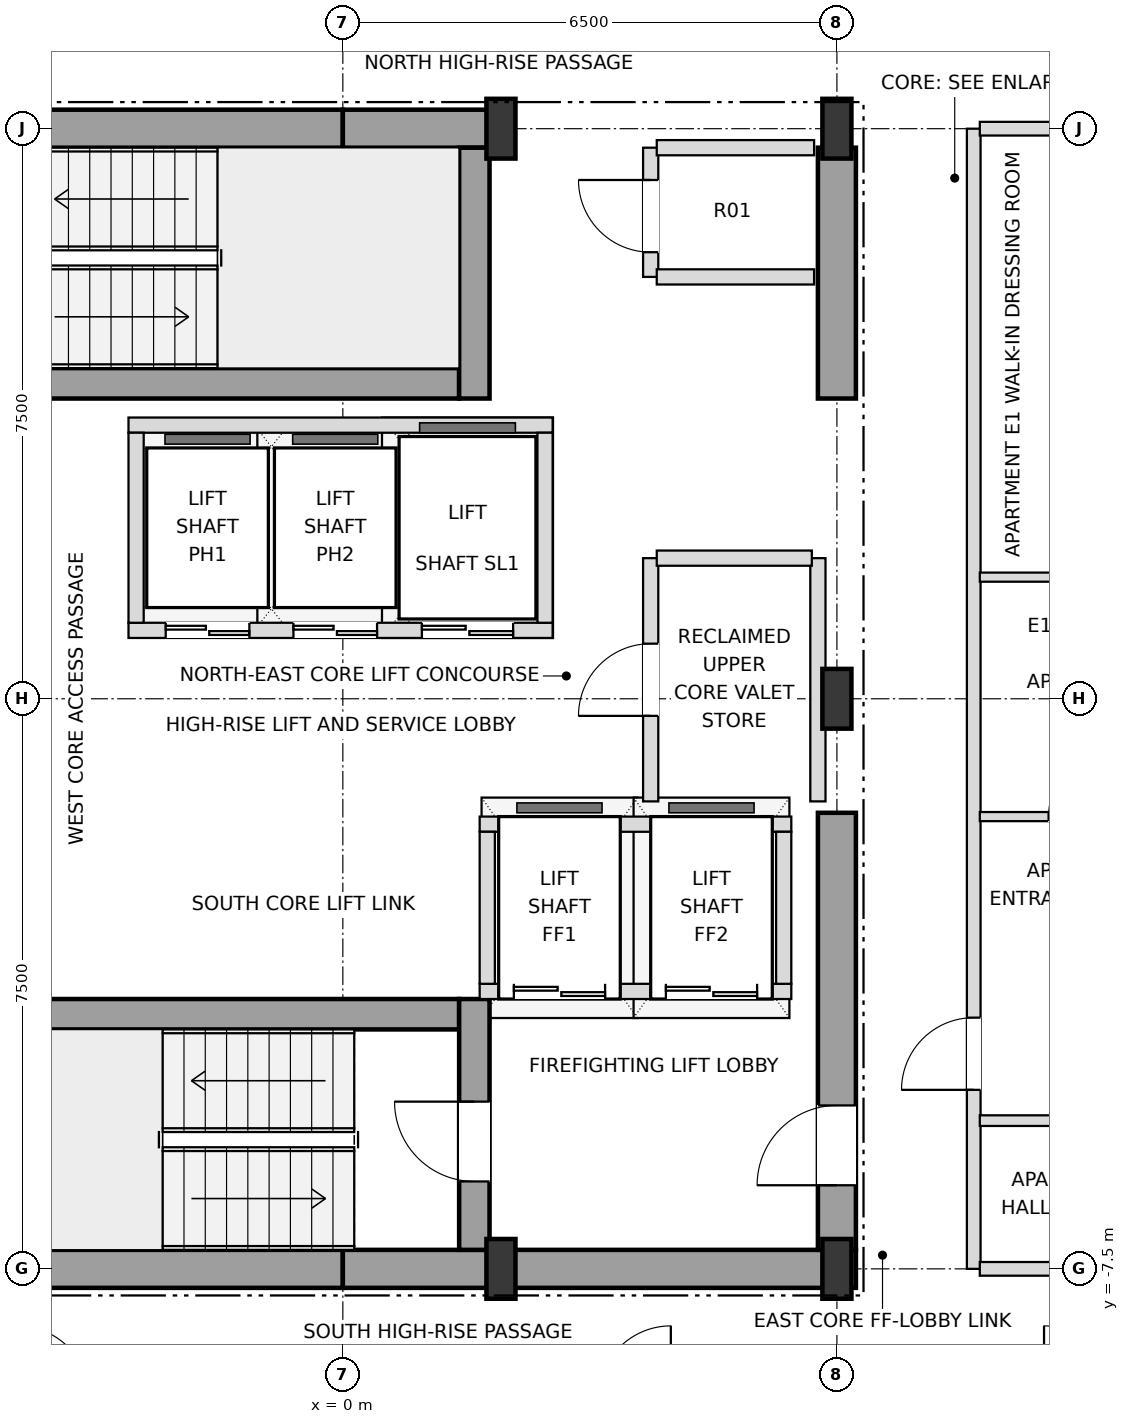
"""IFC4 building model, lengths in metres.
Left out: names, types, materials, properties, quantities, classifications, styles, units other than length and angle.
Written with IfcOpenShell. Run it as: python <this file> out.ifc"""

import sys

from ifc_helpers import new_model, si_unit, direction, frame, frame_2d, origin, origin_2d, place, context, subcontext, project, spatial, rectangle, i_section, extrude, element, fill, save


model = new_model("IFC4")
c1 = context("Model", 3, precision=1e-05, world=origin(), true_north=direction((0.0, 1.0)))
c2 = subcontext(c1, "Body", "Model", "MODEL_VIEW")
j1 = project(units=[si_unit("LENGTHUNIT", "METRE"), si_unit("PLANEANGLEUNIT", "RADIAN")], contexts=[c1])
p1 = place(None, origin())
s1 = spatial("IfcSite", under=j1, at=p1, CompositionType="ELEMENT")
p2 = place(p1, origin())
s2 = spatial("IfcBuilding", under=s1, at=p2, CompositionType="ELEMENT")
p3 = place(p2, frame((0.0, 0.0, 251.1)))
s3 = spatial("IfcBuildingStorey", under=s2, at=p3, CompositionType="ELEMENT", Elevation=251.1)
for number, where, z_axis, x_axis in (
    (1, (2.08, -7.5, 0.0), (0.0, 0.0, 1.0), (1.0, 0.0, 0.0)),
    (2, (6.5, -7.5, 0.0), (0.0, 0.0, 1.0), (1.0, 0.0, 0.0)),
    (3, (6.5, 0.0, 0.0), (0.0, 0.0, 1.0), (1.0, 0.0, 0.0)),
    (4, (2.08, 7.5, 0.0), (0.0, 0.0, 1.0), (1.0, 0.0, 0.0)),
    (5, (6.5, 7.5, 0.0), (0.0, 0.0, 1.0), (1.0, 0.0, 0.0)),
):
    element("IfcColumn", number, at=place(p3, frame(where, z_axis=z_axis, x_axis=x_axis)), inside=s3, PredefinedType="COLUMN", context=c2, shape_type="SweptSolid", body=[
        extrude(i_section(OverallWidth=0.382, OverallDepth=0.786, WebThickness=0.02, FlangeThickness=0.033, at=origin_2d()), origin(), (0.0, 0.0, 1.0), 3.6),
    ])
for number, where, z_axis, x_axis in (
    (6, (-6.75, -7.5, 0.0), (0.0, 0.0, 1.0), (1.0, 0.0, 0.0)),
    (7, (0.0, -7.5, 0.0), (0.0, 0.0, 1.0), (1.0, 0.0, 0.0)),
):
    element("IfcWall", number, at=place(p3, frame(where, z_axis=z_axis, x_axis=x_axis)), inside=s3, PredefinedType="SHEAR", context=c2, shape_type="SweptSolid", body=[
        extrude(rectangle(XDim=6.75, YDim=0.5, at=frame_2d((3.375, 0.0))), origin(), (0.0, 0.0, 1.0), 3.38),
    ])
p4 = place(p3, frame((-6.75, 7.5, 0.0), z_axis=(0.0, 0.0, 1.0), x_axis=(1.0, 0.0, 0.0)))
e8 = element("IfcWall", 8, at=p4, inside=s3, PredefinedType="SHEAR", context=c2, shape_type="SweptSolid", body=[
    extrude(rectangle(XDim=6.75, YDim=0.5, at=frame_2d((3.375, 0.0))), origin(), (0.0, 0.0, 1.0), 3.38),
])
p5 = place(p4, frame((1.65, 0.0, 0.0)))
e9 = element("IfcOpeningElement", 9, at=p5, cuts=e8, PredefinedType="OPENING", context=c2, shape_type="SweptSolid", body=[
    extrude(rectangle(XDim=1.05, YDim=2.15, at=frame_2d((0.525, 1.075))), frame((0.0, 0.26, 0.0), z_axis=(0.0, -1.0, 0.0), x_axis=(1.0, 0.0, 0.0)), (0.0, 0.0, 1.0), 0.52),
])
p6 = place(p3, frame((0.0, 7.5, 0.0), z_axis=(0.0, 0.0, 1.0), x_axis=(1.0, 0.0, 0.0)))
e10 = element("IfcWall", 10, at=p6, inside=s3, PredefinedType="SHEAR", context=c2, shape_type="SweptSolid", body=[
    extrude(rectangle(XDim=2.08, YDim=0.5, at=frame_2d((1.04, 0.0))), origin(), (0.0, 0.0, 1.0), 3.38),
])
p7 = place(p3, frame((6.5, -7.25, 0.0), z_axis=(0.0, 0.0, 1.0), x_axis=(0.0, 1.0, 0.0)))
e11 = element("IfcWall", 11, at=p7, inside=s3, PredefinedType="SHEAR", context=c2, shape_type="SweptSolid", body=[
    extrude(rectangle(XDim=5.75, YDim=0.5, at=frame_2d((2.875, 0.0))), origin(), (0.0, 0.0, 1.0), 3.38),
])
p8 = place(p7, frame((0.85, 0.0, 0.0)))
e12 = element("IfcOpeningElement", 12, at=p8, cuts=e11, PredefinedType="OPENING", context=c2, shape_type="SweptSolid", body=[
    extrude(rectangle(XDim=1.05, YDim=2.15, at=frame_2d((0.525, 1.075))), frame((0.0, 0.26, 0.0), z_axis=(0.0, -1.0, 0.0), x_axis=(1.0, 0.0, 0.0)), (0.0, 0.0, 1.0), 0.52),
])
p9 = place(p3, frame((6.5, 3.95, 0.0), z_axis=(0.0, 0.0, 1.0), x_axis=(0.0, 1.0, 0.0)))
e13 = element("IfcWall", 13, at=p9, inside=s3, PredefinedType="SHEAR", context=c2, shape_type="SweptSolid", body=[
    extrude(rectangle(XDim=3.3, YDim=0.5, at=frame_2d((1.65, 0.0))), origin(), (0.0, 0.0, 1.0), 3.38),
])
p10 = place(p3, frame((-6.25, -4.15, 0.0), z_axis=(0.0, 0.0, 1.0), x_axis=(1.0, 0.0, 0.0)))
e14 = element("IfcWall", 14, at=p10, inside=s3, PredefinedType="SHEAR", context=c2, shape_type="SweptSolid", body=[
    extrude(rectangle(XDim=7.78, YDim=0.4, at=frame_2d((3.89, 0.0))), origin(), (0.0, 0.0, 1.0), 3.38),
])
p11 = place(p3, frame((1.73, -7.25, 0.0), z_axis=(0.0, 0.0, 1.0), x_axis=(0.0, 1.0, 0.0)))
e15 = element("IfcWall", 15, at=p11, inside=s3, PredefinedType="SHEAR", context=c2, shape_type="SweptSolid", body=[
    extrude(rectangle(XDim=3.3, YDim=0.4, at=frame_2d((1.65, 0.0))), origin(), (0.0, 0.0, 1.0), 3.38),
])
p12 = place(p11, frame((0.9, 0.0, 0.0)))
e16 = element("IfcOpeningElement", 16, at=p12, cuts=e15, PredefinedType="OPENING", context=c2, shape_type="SweptSolid", body=[
    extrude(rectangle(XDim=1.05, YDim=2.15, at=frame_2d((0.525, 1.075))), frame((0.0, 0.21, 0.0), z_axis=(0.0, -1.0, 0.0), x_axis=(1.0, 0.0, 0.0)), (0.0, 0.0, 1.0), 0.42),
])
p13 = place(p3, frame((-5.55, 4.15, 0.0), z_axis=(0.0, 0.0, 1.0), x_axis=(1.0, 0.0, 0.0)))
e17 = element("IfcWall", 17, at=p13, inside=s3, PredefinedType="SHEAR", context=c2, shape_type="SweptSolid", body=[
    extrude(rectangle(XDim=7.08, YDim=0.4, at=frame_2d((3.54, 0.0))), origin(), (0.0, 0.0, 1.0), 3.38),
])
p14 = place(p3, frame((1.73, 3.95, 0.0), z_axis=(0.0, 0.0, 1.0), x_axis=(0.0, 1.0, 0.0)))
e18 = element("IfcWall", 18, at=p14, inside=s3, PredefinedType="SHEAR", context=c2, shape_type="SweptSolid", body=[
    extrude(rectangle(XDim=3.3, YDim=0.4, at=frame_2d((1.65, 0.0))), origin(), (0.0, 0.0, 1.0), 3.38),
])
p15 = place(p3, frame((-2.82, 0.9, 0.0), z_axis=(0.0, 0.0, 1.0), x_axis=(1.0, 0.0, 0.0)))
e19 = element("IfcWall", 19, at=p15, inside=s3, PredefinedType="SOLIDWALL", context=c2, shape_type="SweptSolid", body=[
    extrude(rectangle(XDim=5.58, YDim=0.2, at=frame_2d((2.79, 0.0))), origin(), (0.0, 0.0, 1.0), 3.38),
])
p16 = place(p15, frame((0.49, 0.0, 0.0)))
e20 = element("IfcOpeningElement", 20, at=p16, cuts=e19, PredefinedType="OPENING", context=c2, shape_type="SweptSolid", body=[
    extrude(rectangle(XDim=1.1, YDim=2.15, at=frame_2d((0.55, 1.075))), frame((0.0, 0.11, 0.0), z_axis=(0.0, -1.0, 0.0), x_axis=(1.0, 0.0, 0.0)), (0.0, 0.0, 1.0), 0.22),
])
p17 = place(p15, frame((2.17, 0.0, 0.0)))
e21 = element("IfcOpeningElement", 21, at=p17, cuts=e19, PredefinedType="OPENING", context=c2, shape_type="SweptSolid", body=[
    extrude(rectangle(XDim=1.1, YDim=2.15, at=frame_2d((0.55, 1.075))), frame((0.0, 0.11, 0.0), z_axis=(0.0, -1.0, 0.0), x_axis=(1.0, 0.0, 0.0)), (0.0, 0.0, 1.0), 0.22),
])
p18 = place(p15, frame((3.86, 0.0, 0.0)))
e22 = element("IfcOpeningElement", 22, at=p18, cuts=e19, PredefinedType="OPENING", context=c2, shape_type="SweptSolid", body=[
    extrude(rectangle(XDim=1.2, YDim=2.2, at=frame_2d((0.6, 1.1))), frame((0.0, 0.11, 0.0), z_axis=(0.0, -1.0, 0.0), x_axis=(1.0, 0.0, 0.0)), (0.0, 0.0, 1.0), 0.22),
])
p19 = place(p3, frame((-2.82, 3.6, 0.0), z_axis=(0.0, 0.0, 1.0), x_axis=(1.0, 0.0, 0.0)))
e23 = element("IfcWall", 23, at=p19, inside=s3, PredefinedType="SOLIDWALL", context=c2, shape_type="SweptSolid", body=[
    extrude(rectangle(XDim=5.58, YDim=0.2, at=frame_2d((2.79, 0.0))), origin(), (0.0, 0.0, 1.0), 3.38),
])
for number, where, z_axis, x_axis in (
    (24, (-2.72, 1.0, 0.0), (0.0, 0.0, 1.0), (0.0, 1.0, 0.0)),
    (25, (2.66, 1.0, 0.0), (0.0, 0.0, 1.0), (0.0, 1.0, 0.0)),
):
    element("IfcWall", number, at=place(p3, frame(where, z_axis=z_axis, x_axis=x_axis)), inside=s3, PredefinedType="SOLIDWALL", context=c2, shape_type="SweptSolid", body=[
        extrude(rectangle(XDim=2.5, YDim=0.2, at=frame_2d((1.25, 0.0))), origin(), (0.0, 0.0, 1.0), 3.38),
    ])
p20 = place(p3, frame((1.8, -3.85, 0.0), z_axis=(0.0, 0.0, 1.0), x_axis=(1.0, 0.0, 0.0)))
e26 = element("IfcWall", 26, at=p20, inside=s3, PredefinedType="SOLIDWALL", context=c2, shape_type="SweptSolid", body=[
    extrude(rectangle(XDim=4.1, YDim=0.2, at=frame_2d((2.05, 0.0))), origin(), (0.0, 0.0, 1.0), 3.38),
])
p21 = place(p20, frame((0.45, 0.0, 0.0)))
e27 = element("IfcOpeningElement", 27, at=p21, cuts=e26, PredefinedType="OPENING", context=c2, shape_type="SweptSolid", body=[
    extrude(rectangle(XDim=1.2, YDim=2.2, at=frame_2d((0.6, 1.1))), frame((0.0, 0.11, 0.0), z_axis=(0.0, -1.0, 0.0), x_axis=(1.0, 0.0, 0.0)), (0.0, 0.0, 1.0), 0.22),
])
p22 = place(p20, frame((2.45, 0.0, 0.0)))
e28 = element("IfcOpeningElement", 28, at=p22, cuts=e26, PredefinedType="OPENING", context=c2, shape_type="SweptSolid", body=[
    extrude(rectangle(XDim=1.2, YDim=2.2, at=frame_2d((0.6, 1.1))), frame((0.0, 0.11, 0.0), z_axis=(0.0, -1.0, 0.0), x_axis=(1.0, 0.0, 0.0)), (0.0, 0.0, 1.0), 0.22),
])
p23 = place(p3, frame((1.8, -1.65, 0.0), z_axis=(0.0, 0.0, 1.0), x_axis=(1.0, 0.0, 0.0)))
e29 = element("IfcWall", 29, at=p23, inside=s3, PredefinedType="SOLIDWALL", context=c2, shape_type="SweptSolid", body=[
    extrude(rectangle(XDim=4.1, YDim=0.2, at=frame_2d((2.05, 0.0))), origin(), (0.0, 0.0, 1.0), 3.38),
])
for number, where, z_axis, x_axis in (
    (30, (1.9, -3.75, 0.0), (0.0, 0.0, 1.0), (0.0, 1.0, 0.0)),
    (31, (5.8, -3.75, 0.0), (0.0, 0.0, 1.0), (0.0, 1.0, 0.0)),
):
    element("IfcWall", number, at=place(p3, frame(where, z_axis=z_axis, x_axis=x_axis)), inside=s3, PredefinedType="SOLIDWALL", context=c2, shape_type="SweptSolid", body=[
        extrude(rectangle(XDim=2.0, YDim=0.2, at=frame_2d((1.0, 0.0))), origin(), (0.0, 0.0, 1.0), 3.38),
    ])
p24 = place(p3, frame((4.05, -1.35, 0.0), z_axis=(0.0, 0.0, 1.0), x_axis=(0.0, 1.0, 0.0)))
e32 = element("IfcWall", 32, at=p24, inside=s3, PredefinedType="SOLIDWALL", context=c2, shape_type="SweptSolid", body=[
    extrude(rectangle(XDim=3.2, YDim=0.2, at=frame_2d((1.6, 0.0))), origin(), (0.0, 0.0, 1.0), 3.38),
])
p25 = place(p24, frame((1.125, 0.0, 0.0)))
e33 = element("IfcOpeningElement", 33, at=p25, cuts=e32, PredefinedType="OPENING", context=c2, shape_type="SweptSolid", body=[
    extrude(rectangle(XDim=0.95, YDim=2.15, at=frame_2d((0.475, 1.075))), frame((0.0, 0.11, 0.0), z_axis=(0.0, -1.0, 0.0), x_axis=(1.0, 0.0, 0.0)), (0.0, 0.0, 1.0), 0.22),
])
p26 = place(p3, frame((4.05, 5.55, 0.0), z_axis=(0.0, 0.0, 1.0), x_axis=(0.0, 1.0, 0.0)))
e34 = element("IfcWall", 34, at=p26, inside=s3, PredefinedType="SOLIDWALL", context=c2, shape_type="SweptSolid", body=[
    extrude(rectangle(XDim=1.7, YDim=0.2, at=frame_2d((0.85, 0.0))), origin(), (0.0, 0.0, 1.0), 3.38),
])
p27 = place(p26, frame((0.325, 0.0, 0.0)))
e35 = element("IfcOpeningElement", 35, at=p27, cuts=e34, PredefinedType="OPENING", context=c2, shape_type="SweptSolid", body=[
    extrude(rectangle(XDim=0.95, YDim=2.15, at=frame_2d((0.475, 1.075))), frame((0.0, 0.11, 0.0), z_axis=(0.0, -1.0, 0.0), x_axis=(1.0, 0.0, 0.0)), (0.0, 0.0, 1.0), 0.22),
])
p28 = place(p3, frame((6.25, -1.35, 0.0), z_axis=(0.0, 0.0, 1.0), x_axis=(0.0, 1.0, 0.0)))
e36 = element("IfcWall", 36, at=p28, inside=s3, PredefinedType="SOLIDWALL", context=c2, shape_type="SweptSolid", body=[
    extrude(rectangle(XDim=3.2, YDim=0.2, at=frame_2d((1.6, 0.0))), origin(), (0.0, 0.0, 1.0), 3.38),
])
p29 = place(p3, frame((8.3, -7.5, 0.0), z_axis=(0.0, 0.0, 1.0), x_axis=(0.0, 1.0, 0.0)))
e37 = element("IfcWall", 37, at=p29, inside=s3, PredefinedType="PARTITIONING", context=c2, shape_type="SweptSolid", body=[
    extrude(rectangle(XDim=15.0, YDim=0.18, at=frame_2d((7.5, 0.0))), origin(), (0.0, 0.0, 1.0), 3.38),
])
p30 = place(p29, frame((2.355, 0.0, 0.0)))
e38 = element("IfcOpeningElement", 38, at=p30, cuts=e37, PredefinedType="OPENING", context=c2, shape_type="SweptSolid", body=[
    extrude(rectangle(XDim=0.95, YDim=2.15, at=frame_2d((0.475, 1.075))), frame((0.0, 0.1, 0.0), z_axis=(0.0, -1.0, 0.0), x_axis=(1.0, 0.0, 0.0)), (0.0, 0.0, 1.0), 0.2),
])
p31 = place(p3, frame((8.38, -7.5, 0.0), z_axis=(0.0, 0.0, 1.0), x_axis=(1.0, 0.0, 0.0)))
e39 = element("IfcWall", 39, at=p31, inside=s3, PredefinedType="PARTITIONING", context=c2, shape_type="SweptSolid", body=[
    extrude(rectangle(XDim=2.74, YDim=0.18, at=frame_2d((1.37, 0.0))), origin(), (0.0, 0.0, 1.0), 2.826),
])
p32 = place(p3, frame((8.38, -5.55, 0.0), z_axis=(0.0, 0.0, 1.0), x_axis=(1.0, 0.0, 0.0)))
e40 = element("IfcWall", 40, at=p32, inside=s3, PredefinedType="PARTITIONING", context=c2, shape_type="SweptSolid", body=[
    extrude(rectangle(XDim=2.74, YDim=0.14, at=frame_2d((1.37, 0.0))), origin(), (0.0, 0.0, 1.0), 3.38),
])
p33 = place(p32, frame((0.93, 0.0, 0.0)))
e41 = element("IfcOpeningElement", 41, at=p33, cuts=e40, PredefinedType="OPENING", context=c2, shape_type="SweptSolid", body=[
    extrude(rectangle(XDim=0.9, YDim=2.1, at=frame_2d((0.45, 1.05))), frame((0.0, 0.08, 0.0), z_axis=(0.0, -1.0, 0.0), x_axis=(1.0, 0.0, 0.0)), (0.0, 0.0, 1.0), 0.16),
])
p34 = place(p3, frame((8.38, -1.55, 0.0), z_axis=(0.0, 0.0, 1.0), x_axis=(1.0, 0.0, 0.0)))
e42 = element("IfcWall", 42, at=p34, inside=s3, PredefinedType="PARTITIONING", context=c2, shape_type="SweptSolid", body=[
    extrude(rectangle(XDim=2.74, YDim=0.12, at=frame_2d((1.37, 0.0))), origin(), (0.0, 0.0, 1.0), 3.38),
])
p35 = place(p34, frame((0.905, 0.0, 0.0)))
e43 = element("IfcOpeningElement", 43, at=p35, cuts=e42, PredefinedType="OPENING", context=c2, shape_type="SweptSolid", body=[
    extrude(rectangle(XDim=0.95, YDim=2.1, at=frame_2d((0.475, 1.05))), frame((0.0, 0.07, 0.0), z_axis=(0.0, -1.0, 0.0), x_axis=(1.0, 0.0, 0.0)), (0.0, 0.0, 1.0), 0.14),
])
p36 = place(p3, frame((8.38, 1.6, 0.0), z_axis=(0.0, 0.0, 1.0), x_axis=(1.0, 0.0, 0.0)))
e44 = element("IfcWall", 44, at=p36, inside=s3, PredefinedType="PARTITIONING", context=c2, shape_type="SweptSolid", body=[
    extrude(rectangle(XDim=2.74, YDim=0.12, at=frame_2d((1.37, 0.0))), origin(), (0.0, 0.0, 1.0), 3.38),
])
p37 = place(p36, frame((0.93, 0.0, 0.0)))
e45 = element("IfcOpeningElement", 45, at=p37, cuts=e44, PredefinedType="OPENING", context=c2, shape_type="SweptSolid", body=[
    extrude(rectangle(XDim=0.9, YDim=2.1, at=frame_2d((0.45, 1.05))), frame((0.0, 0.07, 0.0), z_axis=(0.0, -1.0, 0.0), x_axis=(1.0, 0.0, 0.0)), (0.0, 0.0, 1.0), 0.14),
])
p38 = place(p3, frame((4.13, 1.85, 0.0), z_axis=(0.0, 0.0, 1.0), x_axis=(1.0, 0.0, 0.0)))
e46 = element("IfcWall", 46, at=p38, inside=s3, PredefinedType="SOLIDWALL", context=c2, shape_type="SweptSolid", body=[
    extrude(rectangle(XDim=2.04, YDim=0.2, at=frame_2d((1.02, 0.0))), origin(), (0.0, 0.0, 1.0), 3.38),
])
for number, where, z_axis, x_axis in (
    (47, (4.13, 5.55, 0.0), (0.0, 0.0, 1.0), (1.0, 0.0, 0.0)),
    (48, (4.13, 7.25, 0.0), (0.0, 0.0, 1.0), (1.0, 0.0, 0.0)),
):
    element("IfcWall", number, at=place(p3, frame(where, z_axis=z_axis, x_axis=x_axis)), inside=s3, PredefinedType="SOLIDWALL", context=c2, shape_type="SweptSolid", body=[
        extrude(rectangle(XDim=2.07, YDim=0.2, at=frame_2d((1.035, 0.0))), origin(), (0.0, 0.0, 1.0), 3.38),
    ])
p39 = place(p3, frame((8.38, 7.5, 0.0), z_axis=(0.0, 0.0, 1.0), x_axis=(1.0, 0.0, 0.0)))
e49 = element("IfcWall", 49, at=p39, inside=s3, PredefinedType="PARTITIONING", context=c2, shape_type="SweptSolid", body=[
    extrude(rectangle(XDim=2.74, YDim=0.18, at=frame_2d((1.37, 0.0))), origin(), (0.0, 0.0, 1.0), 2.826),
])
p40 = place(p8, origin())
e50 = element("IfcDoor", 50, at=p40, inside=s3, OperationType="SINGLE_SWING_LEFT", PredefinedType="DOOR", context=c2, shape_type="SweptSolid", body=[
    extrude(rectangle(XDim=1.05, YDim=2.15, at=frame_2d((0.525, 1.075))), frame((0.0, 0.025, 0.0), z_axis=(0.0, -1.0, 0.0), x_axis=(1.0, 0.0, 0.0)), (0.0, 0.0, 1.0), 0.05),
])
fill(e12, e50)
p41 = place(p12, origin())
e51 = element("IfcDoor", 51, at=p41, inside=s3, OperationType="SINGLE_SWING_RIGHT", PredefinedType="DOOR", context=c2, shape_type="SweptSolid", body=[
    extrude(rectangle(XDim=1.05, YDim=2.15, at=frame_2d((0.525, 1.075))), frame((0.0, 0.025, 0.0), z_axis=(0.0, -1.0, 0.0), x_axis=(1.0, 0.0, 0.0)), (0.0, 0.0, 1.0), 0.05),
])
fill(e16, e51)
p42 = place(p16, origin())
e52 = element("IfcDoor", 52, at=p42, inside=s3, OperationType="DOUBLE_DOOR_SLIDING", PredefinedType="DOOR", context=c2, shape_type="SweptSolid", body=[
    extrude(rectangle(XDim=1.1, YDim=2.15, at=frame_2d((0.55, 1.075))), frame((0.0, 0.025, 0.0), z_axis=(0.0, -1.0, 0.0), x_axis=(1.0, 0.0, 0.0)), (0.0, 0.0, 1.0), 0.05),
])
fill(e20, e52)
p43 = place(p17, origin())
e53 = element("IfcDoor", 53, at=p43, inside=s3, OperationType="DOUBLE_DOOR_SLIDING", PredefinedType="DOOR", context=c2, shape_type="SweptSolid", body=[
    extrude(rectangle(XDim=1.1, YDim=2.15, at=frame_2d((0.55, 1.075))), frame((0.0, 0.025, 0.0), z_axis=(0.0, -1.0, 0.0), x_axis=(1.0, 0.0, 0.0)), (0.0, 0.0, 1.0), 0.05),
])
fill(e21, e53)
p44 = place(p18, origin())
e54 = element("IfcDoor", 54, at=p44, inside=s3, OperationType="DOUBLE_DOOR_SLIDING", PredefinedType="DOOR", context=c2, shape_type="SweptSolid", body=[
    extrude(rectangle(XDim=1.2, YDim=2.2, at=frame_2d((0.6, 1.1))), frame((0.0, 0.025, 0.0), z_axis=(0.0, -1.0, 0.0), x_axis=(1.0, 0.0, 0.0)), (0.0, 0.0, 1.0), 0.05),
])
fill(e22, e54)
p45 = place(p21, origin())
e55 = element("IfcDoor", 55, at=p45, inside=s3, OperationType="DOUBLE_DOOR_SLIDING", PredefinedType="DOOR", context=c2, shape_type="SweptSolid", body=[
    extrude(rectangle(XDim=1.2, YDim=2.2, at=frame_2d((0.6, 1.1))), frame((0.0, 0.025, 0.0), z_axis=(0.0, -1.0, 0.0), x_axis=(1.0, 0.0, 0.0)), (0.0, 0.0, 1.0), 0.05),
])
fill(e27, e55)
p46 = place(p22, origin())
e56 = element("IfcDoor", 56, at=p46, inside=s3, OperationType="DOUBLE_DOOR_SLIDING", PredefinedType="DOOR", context=c2, shape_type="SweptSolid", body=[
    extrude(rectangle(XDim=1.2, YDim=2.2, at=frame_2d((0.6, 1.1))), frame((0.0, 0.025, 0.0), z_axis=(0.0, -1.0, 0.0), x_axis=(1.0, 0.0, 0.0)), (0.0, 0.0, 1.0), 0.05),
])
fill(e28, e56)
p47 = place(p25, origin())
e57 = element("IfcDoor", 57, at=p47, inside=s3, OperationType="SINGLE_SWING_LEFT", PredefinedType="DOOR", context=c2, shape_type="SweptSolid", body=[
    extrude(rectangle(XDim=0.95, YDim=2.15, at=frame_2d((0.475, 1.075))), frame((0.0, 0.025, 0.0), z_axis=(0.0, -1.0, 0.0), x_axis=(1.0, 0.0, 0.0)), (0.0, 0.0, 1.0), 0.05),
])
fill(e33, e57)
p48 = place(p27, origin())
e58 = element("IfcDoor", 58, at=p48, inside=s3, OperationType="SINGLE_SWING_RIGHT", PredefinedType="DOOR", context=c2, shape_type="SweptSolid", body=[
    extrude(rectangle(XDim=0.95, YDim=2.15, at=frame_2d((0.475, 1.075))), frame((0.0, 0.025, 0.0), z_axis=(0.0, -1.0, 0.0), x_axis=(1.0, 0.0, 0.0)), (0.0, 0.0, 1.0), 0.05),
])
fill(e35, e58)
p49 = place(p30, origin())
e59 = element("IfcDoor", 59, at=p49, inside=s3, OperationType="SINGLE_SWING_LEFT", PredefinedType="DOOR", context=c2, shape_type="SweptSolid", body=[
    extrude(rectangle(XDim=0.95, YDim=2.15, at=frame_2d((0.475, 1.075))), frame((0.0, 0.025, 0.0), z_axis=(0.0, -1.0, 0.0), x_axis=(1.0, 0.0, 0.0)), (0.0, 0.0, 1.0), 0.05),
])
fill(e38, e59)
p50 = place(p35, origin())
e60 = element("IfcDoor", 60, at=p50, inside=s3, OperationType="SINGLE_SWING_RIGHT", PredefinedType="DOOR", context=c2, shape_type="SweptSolid", body=[
    extrude(rectangle(XDim=0.95, YDim=2.1, at=frame_2d((0.475, 1.05))), frame((0.0, 0.025, 0.0), z_axis=(0.0, -1.0, 0.0), x_axis=(1.0, 0.0, 0.0)), (0.0, 0.0, 1.0), 0.05),
])
fill(e43, e60)
save(model, sys.argv[1])
